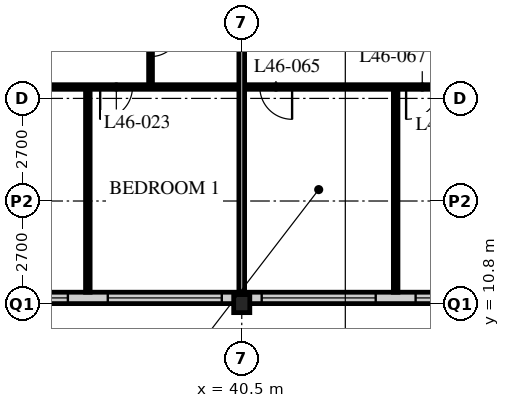
"""IFC4 building model, lengths in metres.
Left out: names, types, materials, properties, quantities, classifications, styles, units other than length and angle.
Written with IfcOpenShell. Run it as: python <this file> out.ifc"""

import sys

from ifc_helpers import new_model, si_unit, direction, frame, frame_2d, origin, origin_2d, place, context, subcontext, project, spatial, rectangle, i_section, extrude, element, fill, save


model = new_model("IFC4")
c1 = context("Model", 3, precision=1e-05, world=origin(), true_north=direction((0.0, 1.0)))
c2 = subcontext(c1, "Body", "Model", "MODEL_VIEW")
j1 = project(units=[si_unit("LENGTHUNIT", "METRE"), si_unit("PLANEANGLEUNIT", "RADIAN")], contexts=[c1])
p1 = place(None, origin())
s1 = spatial("IfcSite", under=j1, at=p1, CompositionType="ELEMENT")
p2 = place(p1, origin())
s2 = spatial("IfcBuilding", under=s1, at=p2, CompositionType="ELEMENT")
p3 = place(p2, frame((0.0, 0.0, 181.2)))
s3 = spatial("IfcBuildingStorey", under=s2, at=p3, CompositionType="ELEMENT", Elevation=181.2)
p4 = place(p3, frame((40.5, 10.8, 0.0), z_axis=(0.0, 0.0, 1.0), x_axis=(1.0, 0.0, 0.0)))
e1 = element("IfcColumn", 1, at=p4, inside=s3, PredefinedType="COLUMN", context=c2, shape_type="SweptSolid", body=[
    extrude(i_section(OverallWidth=0.424, OverallDepth=0.475, WebThickness=0.048, FlangeThickness=0.077, FilletRadius=0.015, at=origin_2d()), origin(), (0.0, 0.0, 1.0), 3.6),
])
p5 = place(p3, frame((8.4, 10.95, 0.0), z_axis=(0.0, 0.0, 1.0), x_axis=(1.0, 0.0, 0.0)))
e2 = element("IfcWall", 2, at=p5, inside=s3, PredefinedType="SOLIDWALL", context=c2, shape_type="SweptSolid", body=[
    extrude(rectangle(XDim=40.2, YDim=0.3, at=frame_2d((20.1, 0.0))), origin(), (0.0, 0.0, 1.0), 3.39),
])
p6 = place(p5, frame((0.225, 0.0, 0.6)))
e3 = element("IfcOpeningElement", 3, at=p6, cuts=e2, PredefinedType="OPENING", context=c2, shape_type="SweptSolid", body=[
    extrude(rectangle(XDim=3.0, YDim=2.4, at=frame_2d((1.5, 1.2))), frame((0.0, 0.16, 0.0), z_axis=(0.0, -1.0, 0.0), x_axis=(1.0, 0.0, 0.0)), (0.0, 0.0, 1.0), 0.32),
])
p7 = place(p5, frame((4.275, 0.0, 0.6)))
e4 = element("IfcOpeningElement", 4, at=p7, cuts=e2, PredefinedType="OPENING", context=c2, shape_type="SweptSolid", body=[
    extrude(rectangle(XDim=3.0, YDim=2.4, at=frame_2d((1.5, 1.2))), frame((0.0, 0.16, 0.0), z_axis=(0.0, -1.0, 0.0), x_axis=(1.0, 0.0, 0.0)), (0.0, 0.0, 1.0), 0.32),
])
p8 = place(p5, frame((8.325, 0.0, 0.6)))
e5 = element("IfcOpeningElement", 5, at=p8, cuts=e2, PredefinedType="OPENING", context=c2, shape_type="SweptSolid", body=[
    extrude(rectangle(XDim=3.0, YDim=2.4, at=frame_2d((1.5, 1.2))), frame((0.0, 0.16, 0.0), z_axis=(0.0, -1.0, 0.0), x_axis=(1.0, 0.0, 0.0)), (0.0, 0.0, 1.0), 0.32),
])
p9 = place(p5, frame((12.375, 0.0, 0.6)))
e6 = element("IfcOpeningElement", 6, at=p9, cuts=e2, PredefinedType="OPENING", context=c2, shape_type="SweptSolid", body=[
    extrude(rectangle(XDim=3.0, YDim=2.4, at=frame_2d((1.5, 1.2))), frame((0.0, 0.16, 0.0), z_axis=(0.0, -1.0, 0.0), x_axis=(1.0, 0.0, 0.0)), (0.0, 0.0, 1.0), 0.32),
])
p10 = place(p5, frame((16.425, 0.0, 0.6)))
e7 = element("IfcOpeningElement", 7, at=p10, cuts=e2, PredefinedType="OPENING", context=c2, shape_type="SweptSolid", body=[
    extrude(rectangle(XDim=3.0, YDim=2.4, at=frame_2d((1.5, 1.2))), frame((0.0, 0.16, 0.0), z_axis=(0.0, -1.0, 0.0), x_axis=(1.0, 0.0, 0.0)), (0.0, 0.0, 1.0), 0.32),
])
p11 = place(p5, frame((20.475, 0.0, 0.6)))
e8 = element("IfcOpeningElement", 8, at=p11, cuts=e2, PredefinedType="OPENING", context=c2, shape_type="SweptSolid", body=[
    extrude(rectangle(XDim=3.0, YDim=2.4, at=frame_2d((1.5, 1.2))), frame((0.0, 0.16, 0.0), z_axis=(0.0, -1.0, 0.0), x_axis=(1.0, 0.0, 0.0)), (0.0, 0.0, 1.0), 0.32),
])
p12 = place(p5, frame((24.525, 0.0, 0.6)))
e9 = element("IfcOpeningElement", 9, at=p12, cuts=e2, PredefinedType="OPENING", context=c2, shape_type="SweptSolid", body=[
    extrude(rectangle(XDim=3.0, YDim=2.4, at=frame_2d((1.5, 1.2))), frame((0.0, 0.16, 0.0), z_axis=(0.0, -1.0, 0.0), x_axis=(1.0, 0.0, 0.0)), (0.0, 0.0, 1.0), 0.32),
])
p13 = place(p5, frame((28.575, 0.0, 0.6)))
e10 = element("IfcOpeningElement", 10, at=p13, cuts=e2, PredefinedType="OPENING", context=c2, shape_type="SweptSolid", body=[
    extrude(rectangle(XDim=3.0, YDim=2.4, at=frame_2d((1.5, 1.2))), frame((0.0, 0.16, 0.0), z_axis=(0.0, -1.0, 0.0), x_axis=(1.0, 0.0, 0.0)), (0.0, 0.0, 1.0), 0.32),
])
p14 = place(p5, frame((32.625, 0.0, 0.6)))
e11 = element("IfcOpeningElement", 11, at=p14, cuts=e2, PredefinedType="OPENING", context=c2, shape_type="SweptSolid", body=[
    extrude(rectangle(XDim=3.0, YDim=2.4, at=frame_2d((1.5, 1.2))), frame((0.0, 0.16, 0.0), z_axis=(0.0, -1.0, 0.0), x_axis=(1.0, 0.0, 0.0)), (0.0, 0.0, 1.0), 0.32),
])
p15 = place(p5, frame((36.675, 0.0, 0.6)))
e12 = element("IfcOpeningElement", 12, at=p15, cuts=e2, PredefinedType="OPENING", context=c2, shape_type="SweptSolid", body=[
    extrude(rectangle(XDim=3.0, YDim=2.4, at=frame_2d((1.5, 1.2))), frame((0.0, 0.16, 0.0), z_axis=(0.0, -1.0, 0.0), x_axis=(1.0, 0.0, 0.0)), (0.0, 0.0, 1.0), 0.32),
])
p16 = place(p3, frame((38.1, 18.9, 0.0), z_axis=(0.0, 0.0, 1.0), x_axis=(0.0, -1.0, 0.0)))
e13 = element("IfcWall", 13, at=p16, inside=s3, PredefinedType="PARTITIONING", context=c2, shape_type="SweptSolid", body=[
    extrude(rectangle(XDim=2.4, YDim=0.1, at=frame_2d((1.2, 0.0))), origin(), (0.0, 0.0, 1.0), 3.39),
])
p17 = place(p16, frame((0.8, 0.0, 0.0)))
e14 = element("IfcOpeningElement", 14, at=p17, cuts=e13, PredefinedType="OPENING", context=c2, shape_type="SweptSolid", body=[
    extrude(rectangle(XDim=0.8, YDim=2.1, at=frame_2d((0.4, 1.05))), frame((0.0, 0.06, 0.0), z_axis=(0.0, -1.0, 0.0), x_axis=(1.0, 0.0, 0.0)), (0.0, 0.0, 1.0), 0.12),
])
p18 = place(p3, frame((36.45, 16.5, 0.0), z_axis=(0.0, 0.0, 1.0), x_axis=(0.0, -1.0, 0.0)))
e15 = element("IfcWall", 15, at=p18, inside=s3, PredefinedType="PARTITIONING", context=c2, shape_type="SweptSolid", body=[
    extrude(rectangle(XDim=5.4, YDim=0.12, at=frame_2d((2.7, 0.0))), origin(), (0.0, 0.0, 1.0), 3.39),
])
p19 = place(p3, frame((8.15, 16.5, 0.0), z_axis=(0.0, 0.0, 1.0), x_axis=(1.0, 0.0, 0.0)))
e16 = element("IfcWall", 16, at=p19, inside=s3, PredefinedType="PARTITIONING", context=c2, shape_type="SweptSolid", body=[
    extrude(rectangle(XDim=40.4, YDim=0.12, at=frame_2d((20.2, 0.0))), origin(), (0.0, 0.0, 1.0), 3.39),
])
p20 = place(p19, frame((9.025, 0.0, 0.0)))
e17 = element("IfcOpeningElement", 17, at=p20, cuts=e16, PredefinedType="OPENING", context=c2, shape_type="SweptSolid", body=[
    extrude(rectangle(XDim=0.85, YDim=2.1, at=frame_2d((0.425, 1.05))), frame((0.0, 0.07, 0.0), z_axis=(0.0, -1.0, 0.0), x_axis=(1.0, 0.0, 0.0)), (0.0, 0.0, 1.0), 0.14),
])
p21 = place(p19, frame((12.425, 0.0, 0.0)))
e18 = element("IfcOpeningElement", 18, at=p21, cuts=e16, PredefinedType="OPENING", context=c2, shape_type="SweptSolid", body=[
    extrude(rectangle(XDim=0.85, YDim=2.1, at=frame_2d((0.425, 1.05))), frame((0.0, 0.07, 0.0), z_axis=(0.0, -1.0, 0.0), x_axis=(1.0, 0.0, 0.0)), (0.0, 0.0, 1.0), 0.14),
])
p22 = place(p19, frame((17.125, 0.0, 0.0)))
e19 = element("IfcOpeningElement", 19, at=p22, cuts=e16, PredefinedType="OPENING", context=c2, shape_type="SweptSolid", body=[
    extrude(rectangle(XDim=0.85, YDim=2.1, at=frame_2d((0.425, 1.05))), frame((0.0, 0.07, 0.0), z_axis=(0.0, -1.0, 0.0), x_axis=(1.0, 0.0, 0.0)), (0.0, 0.0, 1.0), 0.14),
])
p23 = place(p19, frame((20.525, 0.0, 0.0)))
e20 = element("IfcOpeningElement", 20, at=p23, cuts=e16, PredefinedType="OPENING", context=c2, shape_type="SweptSolid", body=[
    extrude(rectangle(XDim=0.85, YDim=2.1, at=frame_2d((0.425, 1.05))), frame((0.0, 0.07, 0.0), z_axis=(0.0, -1.0, 0.0), x_axis=(1.0, 0.0, 0.0)), (0.0, 0.0, 1.0), 0.14),
])
p24 = place(p19, frame((25.225, 0.0, 0.0)))
e21 = element("IfcOpeningElement", 21, at=p24, cuts=e16, PredefinedType="OPENING", context=c2, shape_type="SweptSolid", body=[
    extrude(rectangle(XDim=0.85, YDim=2.1, at=frame_2d((0.425, 1.05))), frame((0.0, 0.07, 0.0), z_axis=(0.0, -1.0, 0.0), x_axis=(1.0, 0.0, 0.0)), (0.0, 0.0, 1.0), 0.14),
])
p25 = place(p19, frame((28.625, 0.0, 0.0)))
e22 = element("IfcOpeningElement", 22, at=p25, cuts=e16, PredefinedType="OPENING", context=c2, shape_type="SweptSolid", body=[
    extrude(rectangle(XDim=0.85, YDim=2.1, at=frame_2d((0.425, 1.05))), frame((0.0, 0.07, 0.0), z_axis=(0.0, -1.0, 0.0), x_axis=(1.0, 0.0, 0.0)), (0.0, 0.0, 1.0), 0.14),
])
p26 = place(p19, frame((6.725, 0.0, 0.0)))
e23 = element("IfcOpeningElement", 23, at=p26, cuts=e16, PredefinedType="OPENING", context=c2, shape_type="SweptSolid", body=[
    extrude(rectangle(XDim=0.85, YDim=2.1, at=frame_2d((0.425, 1.05))), frame((0.0, 0.07, 0.0), z_axis=(0.0, -1.0, 0.0), x_axis=(1.0, 0.0, 0.0)), (0.0, 0.0, 1.0), 0.14),
])
p27 = place(p19, frame((2.875, 0.0, 0.0)))
e24 = element("IfcOpeningElement", 24, at=p27, cuts=e16, PredefinedType="OPENING", context=c2, shape_type="SweptSolid", body=[
    extrude(rectangle(XDim=0.85, YDim=2.1, at=frame_2d((0.425, 1.05))), frame((0.0, 0.07, 0.0), z_axis=(0.0, -1.0, 0.0), x_axis=(1.0, 0.0, 0.0)), (0.0, 0.0, 1.0), 0.14),
])
p28 = place(p19, frame((32.825, 0.0, 0.0)))
e25 = element("IfcOpeningElement", 25, at=p28, cuts=e16, PredefinedType="OPENING", context=c2, shape_type="SweptSolid", body=[
    extrude(rectangle(XDim=0.85, YDim=2.1, at=frame_2d((0.425, 1.05))), frame((0.0, 0.07, 0.0), z_axis=(0.0, -1.0, 0.0), x_axis=(1.0, 0.0, 0.0)), (0.0, 0.0, 1.0), 0.14),
])
p29 = place(p19, frame((36.675, 0.0, 0.0)))
e26 = element("IfcOpeningElement", 26, at=p29, cuts=e16, PredefinedType="OPENING", context=c2, shape_type="SweptSolid", body=[
    extrude(rectangle(XDim=0.85, YDim=2.1, at=frame_2d((0.425, 1.05))), frame((0.0, 0.07, 0.0), z_axis=(0.0, -1.0, 0.0), x_axis=(1.0, 0.0, 0.0)), (0.0, 0.0, 1.0), 0.14),
])
p30 = place(p3, frame((44.55, 16.5, 0.0), z_axis=(0.0, 0.0, 1.0), x_axis=(0.0, -1.0, 0.0)))
e27 = element("IfcWall", 27, at=p30, inside=s3, PredefinedType="PARTITIONING", context=c2, shape_type="SweptSolid", body=[
    extrude(rectangle(XDim=5.4, YDim=0.12, at=frame_2d((2.7, 0.0))), origin(), (0.0, 0.0, 1.0), 3.39),
])
p31 = place(p3, frame((40.5, 18.9, 0.0), z_axis=(0.0, 0.0, 1.0), x_axis=(0.0, -1.0, 0.0)))
e28 = element("IfcWall", 28, at=p31, inside=s3, PredefinedType="PARTITIONING", context=c2, shape_type="SweptSolid", body=[
    extrude(rectangle(XDim=7.8, YDim=0.15, at=frame_2d((3.9, 0.0))), origin(), (0.0, 0.0, 1.0), 2.778),
])
p32 = place(p12, origin())
e29 = element("IfcWindow", 29, at=p32, inside=s3, PartitioningType="SINGLE_PANEL", PredefinedType="WINDOW", context=c2, shape_type="SweptSolid", body=[
    extrude(rectangle(XDim=3.0, YDim=2.4, at=frame_2d((1.5, 1.2))), frame((0.0, 0.03, 0.0), z_axis=(0.0, -1.0, 0.0), x_axis=(1.0, 0.0, 0.0)), (0.0, 0.0, 1.0), 0.06),
])
fill(e9, e29)
p33 = place(p13, origin())
e30 = element("IfcWindow", 30, at=p33, inside=s3, PartitioningType="SINGLE_PANEL", PredefinedType="WINDOW", context=c2, shape_type="SweptSolid", body=[
    extrude(rectangle(XDim=3.0, YDim=2.4, at=frame_2d((1.5, 1.2))), frame((0.0, 0.03, 0.0), z_axis=(0.0, -1.0, 0.0), x_axis=(1.0, 0.0, 0.0)), (0.0, 0.0, 1.0), 0.06),
])
fill(e10, e30)
p34 = place(p14, origin())
e31 = element("IfcWindow", 31, at=p34, inside=s3, PartitioningType="SINGLE_PANEL", PredefinedType="WINDOW", context=c2, shape_type="SweptSolid", body=[
    extrude(rectangle(XDim=3.0, YDim=2.4, at=frame_2d((1.5, 1.2))), frame((0.0, 0.03, 0.0), z_axis=(0.0, -1.0, 0.0), x_axis=(1.0, 0.0, 0.0)), (0.0, 0.0, 1.0), 0.06),
])
fill(e11, e31)
p35 = place(p15, origin())
e32 = element("IfcWindow", 32, at=p35, inside=s3, PartitioningType="SINGLE_PANEL", PredefinedType="WINDOW", context=c2, shape_type="SweptSolid", body=[
    extrude(rectangle(XDim=3.0, YDim=2.4, at=frame_2d((1.5, 1.2))), frame((0.0, 0.03, 0.0), z_axis=(0.0, -1.0, 0.0), x_axis=(1.0, 0.0, 0.0)), (0.0, 0.0, 1.0), 0.06),
])
fill(e12, e32)
p36 = place(p17, origin())
e33 = element("IfcDoor", 33, at=p36, inside=s3, OperationType="SINGLE_SWING_LEFT", PredefinedType="DOOR", context=c2, shape_type="SweptSolid", body=[
    extrude(rectangle(XDim=0.8, YDim=2.1, at=frame_2d((0.4, 1.05))), frame((0.0, 0.025, 0.0), z_axis=(0.0, -1.0, 0.0), x_axis=(1.0, 0.0, 0.0)), (0.0, 0.0, 1.0), 0.05),
])
fill(e14, e33)
p37 = place(p25, origin())
e34 = element("IfcDoor", 34, at=p37, inside=s3, OperationType="SINGLE_SWING_RIGHT", PredefinedType="DOOR", context=c2, shape_type="SweptSolid", body=[
    extrude(rectangle(XDim=0.85, YDim=2.1, at=frame_2d((0.425, 1.05))), frame((0.0, 0.025, 0.0), z_axis=(0.0, -1.0, 0.0), x_axis=(1.0, 0.0, 0.0)), (0.0, 0.0, 1.0), 0.05),
])
fill(e22, e34)
p38 = place(p28, origin())
e35 = element("IfcDoor", 35, at=p38, inside=s3, OperationType="SINGLE_SWING_LEFT", PredefinedType="DOOR", context=c2, shape_type="SweptSolid", body=[
    extrude(rectangle(XDim=0.85, YDim=2.1, at=frame_2d((0.425, 1.05))), frame((0.0, 0.025, 0.0), z_axis=(0.0, -1.0, 0.0), x_axis=(1.0, 0.0, 0.0)), (0.0, 0.0, 1.0), 0.05),
])
fill(e25, e35)
p39 = place(p29, origin())
e36 = element("IfcDoor", 36, at=p39, inside=s3, OperationType="SINGLE_SWING_RIGHT", PredefinedType="DOOR", context=c2, shape_type="SweptSolid", body=[
    extrude(rectangle(XDim=0.85, YDim=2.1, at=frame_2d((0.425, 1.05))), frame((0.0, 0.025, 0.0), z_axis=(0.0, -1.0, 0.0), x_axis=(1.0, 0.0, 0.0)), (0.0, 0.0, 1.0), 0.05),
])
fill(e26, e36)
save(model, sys.argv[1])
